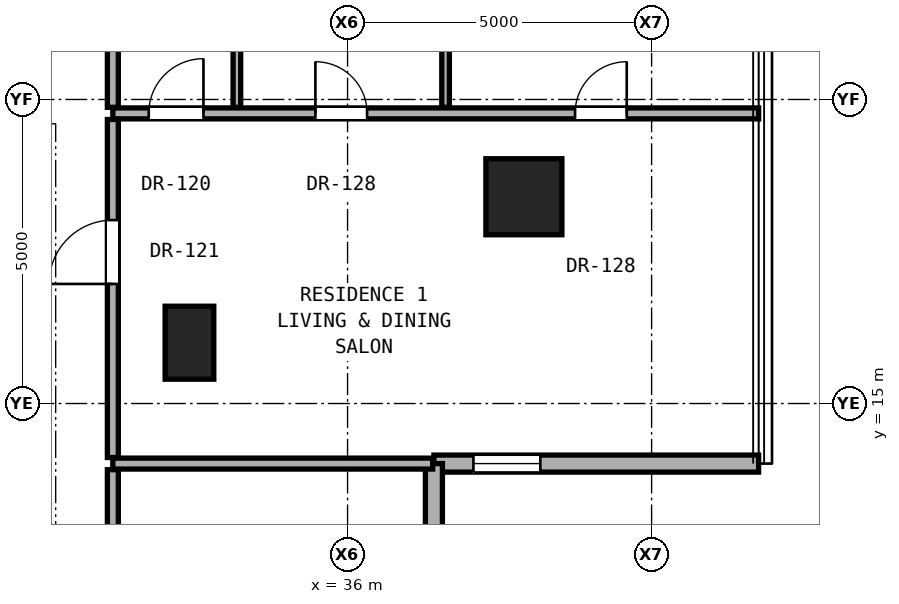
"""IFC4 building model, lengths in metres.
Left out: names, types, materials, properties, quantities, classifications, styles, units other than length and angle.
Written with IfcOpenShell. Run it as: python <this file> out.ifc"""

import sys

from ifc_helpers import new_model, si_unit, direction, frame, frame_2d, origin, origin_2d, place, context, subcontext, project, spatial, rectangle, hollow_rectangle, extrude, element, fill, save


model = new_model("IFC4")
c1 = context("Model", 3, precision=1e-05, world=origin(), true_north=direction((0.0, 1.0)))
c2 = subcontext(c1, "Body", "Model", "MODEL_VIEW")
j1 = project(units=[si_unit("LENGTHUNIT", "METRE"), si_unit("PLANEANGLEUNIT", "RADIAN")], contexts=[c1])
p1 = place(None, origin())
s1 = spatial("IfcSite", under=j1, at=p1, CompositionType="ELEMENT")
p2 = place(p1, origin())
s2 = spatial("IfcBuilding", under=s1, at=p2, CompositionType="ELEMENT")
p3 = place(p2, frame((0.0, 0.0, 71.9)))
s3 = spatial("IfcBuildingStorey", under=s2, at=p3, CompositionType="ELEMENT", Elevation=71.9)
p4 = place(p3, frame((38.9, 18.4, 0.0), z_axis=(0.0, 0.0, 1.0), x_axis=(1.0, 0.0, 0.0)))
e1 = element("IfcColumn", 1, at=p4, inside=s3, PredefinedType="COLUMN", context=c2, shape_type="SweptSolid", body=[
    extrude(hollow_rectangle(XDim=1.25, YDim=1.25, WallThickness=0.07, at=origin_2d()), origin(), (0.0, 0.0, 1.0), 3.3),
])
p5 = place(p3, frame((33.4, 16.0, 0.0), z_axis=(0.0, 0.0, 1.0), x_axis=(1.0, 0.0, 0.0)))
e2 = element("IfcColumn", 2, at=p5, inside=s3, PredefinedType="PILASTER", context=c2, shape_type="SweptSolid", body=[
    extrude(rectangle(XDim=0.8, YDim=1.2, at=origin_2d()), origin(), (0.0, 0.0, 1.0), 3.3),
])
p6 = place(p3, frame((37.42, 14.012, 0.0), z_axis=(0.0, 0.0, 1.0), x_axis=(1.0, 0.0, 0.0)))
e3 = element("IfcWall", 3, at=p6, inside=s3, PredefinedType="SOLIDWALL", context=c2, shape_type="SweptSolid", body=[
    extrude(rectangle(XDim=5.34, YDim=0.28, at=frame_2d((2.67, 0.0))), origin(), (0.0, 0.0, 1.0), 3.04),
])
p7 = place(p6, frame((0.65, 0.0, 0.85)))
e4 = element("IfcOpeningElement", 4, at=p7, cuts=e3, PredefinedType="OPENING", context=c2, shape_type="SweptSolid", body=[
    extrude(rectangle(XDim=1.1, YDim=2.0, at=frame_2d((0.55, 1.0))), frame((0.0, 0.15, 0.0), z_axis=(0.0, -1.0, 0.0), x_axis=(1.0, 0.0, 0.0)), (0.0, 0.0, 1.0), 0.3),
])
p8 = place(p3, frame((37.42, 8.672, 0.0), z_axis=(0.0, 0.0, 1.0), x_axis=(0.0, 1.0, 0.0)))
e5 = element("IfcWall", 5, at=p8, inside=s3, PredefinedType="SOLIDWALL", context=c2, shape_type="SweptSolid", body=[
    extrude(rectangle(XDim=5.34, YDim=0.28, at=frame_2d((2.67, 0.0))), origin(), (0.0, 0.0, 1.0), 3.04),
])
p9 = place(p3, frame((32.14, 14.012, 0.0), z_axis=(0.0, 0.0, 1.0), x_axis=(1.0, 0.0, 0.0)))
e6 = element("IfcWall", 6, at=p9, inside=s3, PredefinedType="PARTITIONING", context=c2, shape_type="SweptSolid", body=[
    extrude(rectangle(XDim=5.26, YDim=0.18, at=frame_2d((2.63, 0.0))), origin(), (0.0, 0.0, 1.0), 3.06),
])
p10 = place(p3, frame((32.14, 19.771, 0.0), z_axis=(0.0, 0.0, 1.0), x_axis=(1.0, 0.0, 0.0)))
e7 = element("IfcWall", 7, at=p10, inside=s3, PredefinedType="PARTITIONING", context=c2, shape_type="SweptSolid", body=[
    extrude(rectangle(XDim=10.62, YDim=0.18, at=frame_2d((5.31, 0.0))), origin(), (0.0, 0.0, 1.0), 2.125),
])
p11 = place(p10, frame((7.601, 0.0, 0.0)))
e8 = element("IfcOpeningElement", 8, at=p11, cuts=e7, PredefinedType="OPENING", context=c2, shape_type="SweptSolid", body=[
    extrude(rectangle(XDim=0.85, YDim=2.01, at=frame_2d((0.425, 1.005))), frame((0.0, 0.1, 0.0), z_axis=(0.0, -1.0, 0.0), x_axis=(1.0, 0.0, 0.0)), (0.0, 0.0, 1.0), 0.2),
])
p12 = place(p10, frame((3.331, 0.0, 0.0)))
e9 = element("IfcOpeningElement", 9, at=p12, cuts=e7, PredefinedType="OPENING", context=c2, shape_type="SweptSolid", body=[
    extrude(rectangle(XDim=0.85, YDim=2.01, at=frame_2d((0.425, 1.005))), frame((0.0, 0.1, 0.0), z_axis=(0.0, -1.0, 0.0), x_axis=(1.0, 0.0, 0.0)), (0.0, 0.0, 1.0), 0.2),
])
p13 = place(p10, frame((0.59, 0.0, 0.0)))
e10 = element("IfcOpeningElement", 10, at=p13, cuts=e7, PredefinedType="OPENING", context=c2, shape_type="SweptSolid", body=[
    extrude(rectangle(XDim=0.9, YDim=2.1, at=frame_2d((0.45, 1.05))), frame((0.0, 0.1, 0.0), z_axis=(0.0, -1.0, 0.0), x_axis=(1.0, 0.0, 0.0)), (0.0, 0.0, 1.0), 0.2),
])
p14 = place(p3, frame((32.14, 8.672, 0.0), z_axis=(0.0, 0.0, 1.0), x_axis=(0.0, 1.0, 0.0)))
e11 = element("IfcWall", 11, at=p14, inside=s3, PredefinedType="PARTITIONING", context=c2, shape_type="SweptSolid", body=[
    extrude(rectangle(XDim=5.24, YDim=0.18, at=frame_2d((2.62, 0.0))), origin(), (0.0, 0.0, 1.0), 3.06),
])
p15 = place(p14, frame((2.145, 0.0, 0.0)))
e12 = element("IfcOpeningElement", 12, at=p15, cuts=e11, PredefinedType="OPENING", context=c2, shape_type="SweptSolid", body=[
    extrude(rectangle(XDim=0.95, YDim=2.15, at=frame_2d((0.475, 1.075))), frame((0.0, 0.1, 0.0), z_axis=(0.0, -1.0, 0.0), x_axis=(1.0, 0.0, 0.0)), (0.0, 0.0, 1.0), 0.2),
])
p16 = place(p3, frame((32.14, 14.112, 0.0), z_axis=(0.0, 0.0, 1.0), x_axis=(0.0, 1.0, 0.0)))
e13 = element("IfcWall", 13, at=p16, inside=s3, PredefinedType="PARTITIONING", context=c2, shape_type="SweptSolid", body=[
    extrude(rectangle(XDim=5.559, YDim=0.18, at=frame_2d((2.779, 0.0))), origin(), (0.0, 0.0, 1.0), 2.436),
])
p17 = place(p16, frame((2.854, 0.0, 0.0)))
e14 = element("IfcOpeningElement", 14, at=p17, cuts=e13, PredefinedType="OPENING", context=c2, shape_type="SweptSolid", body=[
    extrude(rectangle(XDim=1.05, YDim=2.2, at=frame_2d((0.525, 1.1))), frame((0.0, 0.1, 0.0), z_axis=(0.0, -1.0, 0.0), x_axis=(1.0, 0.0, 0.0)), (0.0, 0.0, 1.0), 0.2),
])
p18 = place(p3, frame((32.14, 19.871, 0.0), z_axis=(0.0, 0.0, 1.0), x_axis=(0.0, 1.0, 0.0)))
e15 = element("IfcWall", 15, at=p18, inside=s3, PredefinedType="PARTITIONING", context=c2, shape_type="SweptSolid", body=[
    extrude(rectangle(XDim=2.52, YDim=0.18, at=frame_2d((1.26, 0.0))), origin(), (0.0, 0.0, 1.0), 3.06),
])
for number, where, z_axis, x_axis in (
    (16, (34.18, 19.871, 0.0), (0.0, 0.0, 1.0), (0.0, 1.0, 0.0)),
    (17, (37.612, 19.871, 0.0), (0.0, 0.0, 1.0), (0.0, 1.0, 0.0)),
):
    element("IfcWall", number, at=place(p3, frame(where, z_axis=z_axis, x_axis=x_axis)), inside=s3, PredefinedType="PARTITIONING", context=c2, shape_type="SweptSolid", body=[
        extrude(rectangle(XDim=2.52, YDim=0.125, at=frame_2d((1.26, 0.0))), origin(), (0.0, 0.0, 1.0), 3.06),
    ])
p19 = place(p7, origin())
e18 = element("IfcWindow", 18, at=p19, inside=s3, PartitioningType="SINGLE_PANEL", PredefinedType="WINDOW", context=c2, shape_type="SweptSolid", body=[
    extrude(rectangle(XDim=1.1, YDim=2.0, at=frame_2d((0.55, 1.0))), frame((0.0, 0.03, 0.0), z_axis=(0.0, -1.0, 0.0), x_axis=(1.0, 0.0, 0.0)), (0.0, 0.0, 1.0), 0.06),
])
fill(e4, e18)
p20 = place(p17, origin())
e19 = element("IfcDoor", 19, at=p20, inside=s3, OperationType="SINGLE_SWING_LEFT", PredefinedType="DOOR", context=c2, shape_type="SweptSolid", body=[
    extrude(rectangle(XDim=1.05, YDim=2.2, at=frame_2d((0.525, 1.1))), frame((0.0, 0.025, 0.0), z_axis=(0.0, -1.0, 0.0), x_axis=(1.0, 0.0, 0.0)), (0.0, 0.0, 1.0), 0.05),
])
fill(e14, e19)
p21 = place(p11, origin())
e20 = element("IfcDoor", 20, at=p21, inside=s3, OperationType="SINGLE_SWING_RIGHT", PredefinedType="DOOR", context=c2, shape_type="SweptSolid", body=[
    extrude(rectangle(XDim=0.85, YDim=2.01, at=frame_2d((0.425, 1.005))), frame((0.0, 0.025, 0.0), z_axis=(0.0, -1.0, 0.0), x_axis=(1.0, 0.0, 0.0)), (0.0, 0.0, 1.0), 0.05),
])
fill(e8, e20)
p22 = place(p12, origin())
e21 = element("IfcDoor", 21, at=p22, inside=s3, OperationType="SINGLE_SWING_LEFT", PredefinedType="DOOR", context=c2, shape_type="SweptSolid", body=[
    extrude(rectangle(XDim=0.85, YDim=2.01, at=frame_2d((0.425, 1.005))), frame((0.0, 0.025, 0.0), z_axis=(0.0, -1.0, 0.0), x_axis=(1.0, 0.0, 0.0)), (0.0, 0.0, 1.0), 0.05),
])
fill(e9, e21)
p23 = place(p13, origin())
e22 = element("IfcDoor", 22, at=p23, inside=s3, OperationType="SINGLE_SWING_RIGHT", PredefinedType="DOOR", context=c2, shape_type="SweptSolid", body=[
    extrude(rectangle(XDim=0.9, YDim=2.1, at=frame_2d((0.45, 1.05))), frame((0.0, 0.025, 0.0), z_axis=(0.0, -1.0, 0.0), x_axis=(1.0, 0.0, 0.0)), (0.0, 0.0, 1.0), 0.05),
])
fill(e10, e22)
save(model, sys.argv[1])
